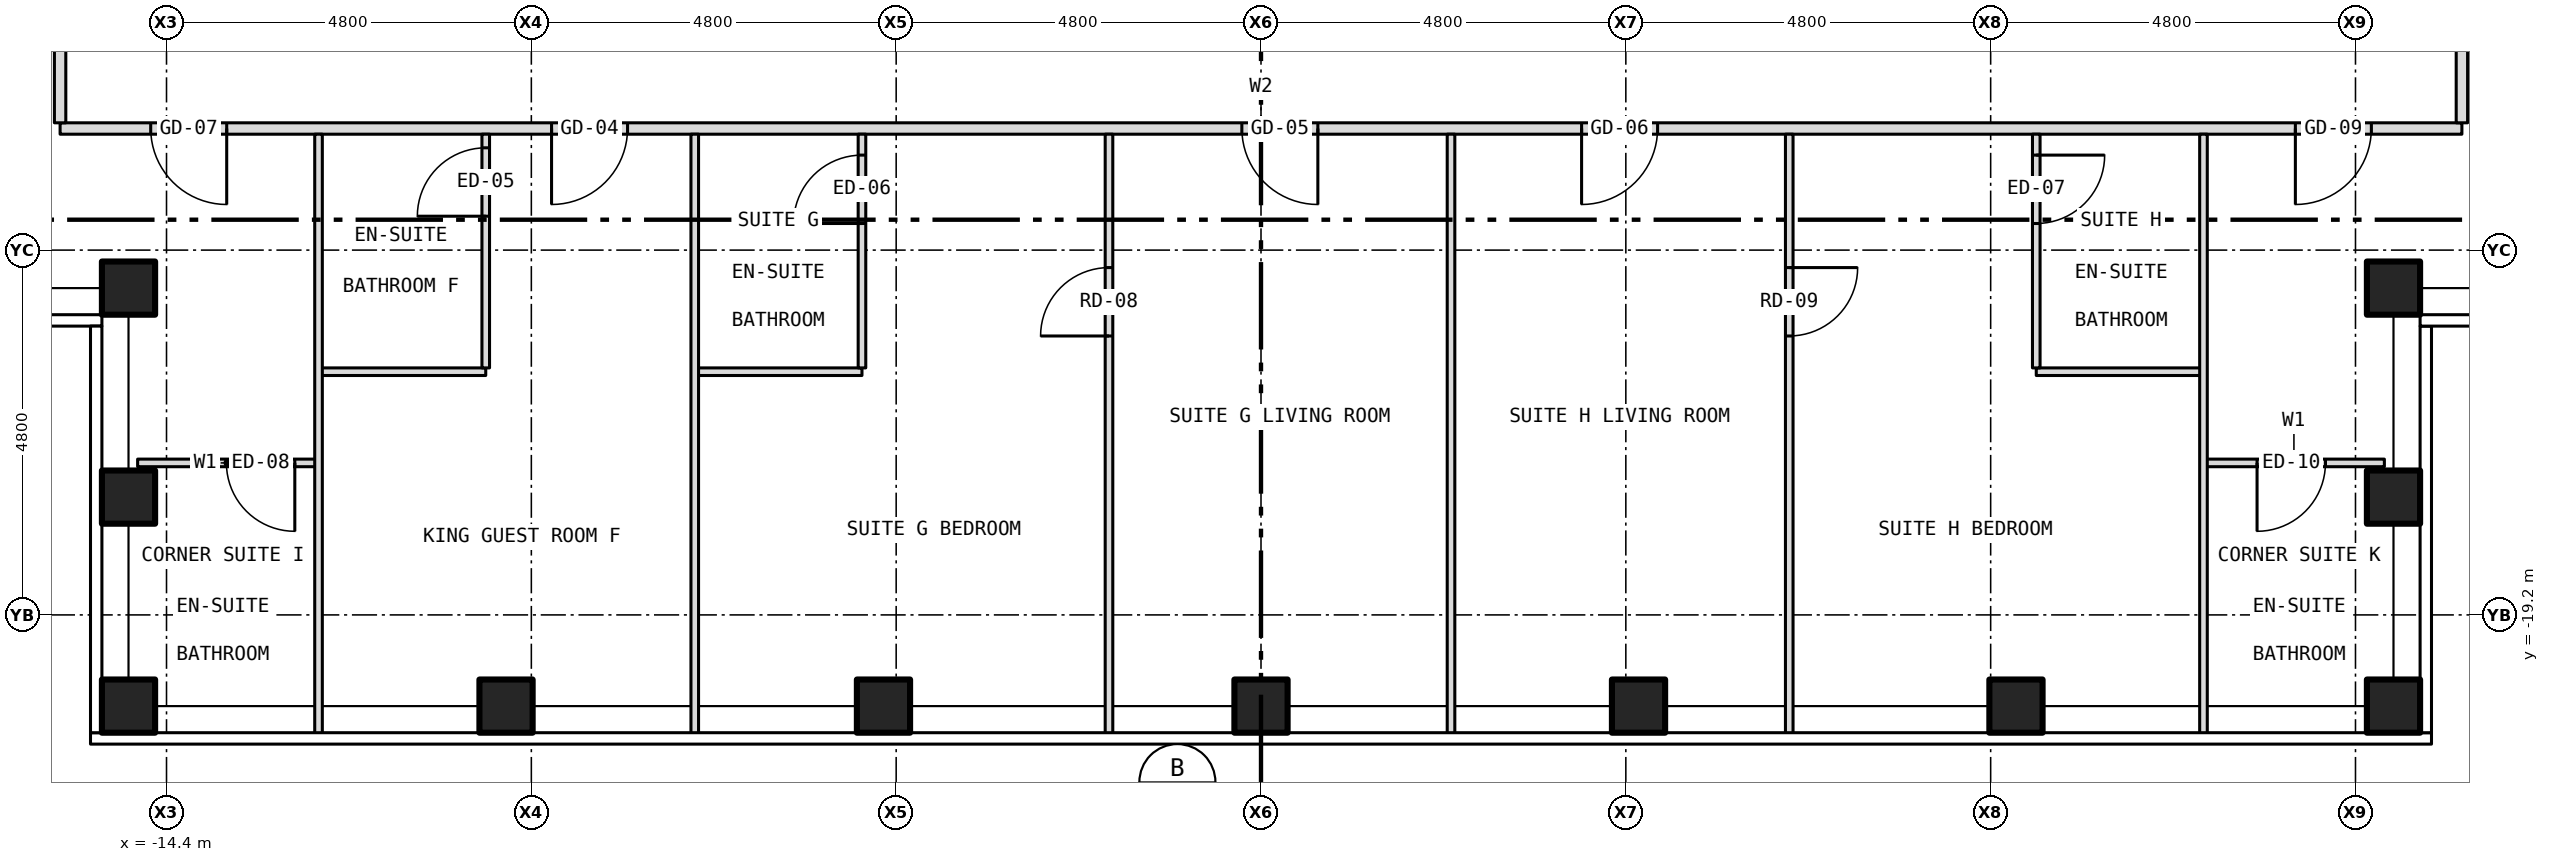
"""IFC4 building model, lengths in metres.
Left out: names, types, materials, properties, quantities, classifications, styles, units other than length and angle.
Written with IfcOpenShell. Run it as: python <this file> out.ifc"""

import sys

from ifc_helpers import new_model, si_unit, direction, frame, frame_2d, origin, origin_2d, place, context, subcontext, project, spatial, rectangle, hollow_rectangle, extrude, element, fill, save


model = new_model("IFC4")
c1 = context("Model", 3, precision=1e-05, world=origin(), true_north=direction((0.0, 1.0)))
c2 = subcontext(c1, "Body", "Model", "MODEL_VIEW")
j1 = project(units=[si_unit("LENGTHUNIT", "METRE"), si_unit("PLANEANGLEUNIT", "RADIAN")], contexts=[c1])
p1 = place(None, origin())
s1 = spatial("IfcSite", under=j1, at=p1, CompositionType="ELEMENT")
p2 = place(p1, origin())
s2 = spatial("IfcBuilding", under=s1, at=p2, CompositionType="ELEMENT")
p3 = place(p2, frame((0.0, 0.0, 215.5)))
s3 = spatial("IfcBuildingStorey", under=s2, at=p3, CompositionType="ELEMENT", Elevation=215.5)
for number, where, z_axis, x_axis in (
    (1, (-14.9, -20.4, -0.15), (0.0, 0.0, 1.0), (1.0, 0.0, 0.0)),
    (2, (-9.933, -20.4, -0.15), (0.0, 0.0, 1.0), (1.0, 0.0, 0.0)),
    (3, (-4.967, -20.4, -0.15), (0.0, 0.0, 1.0), (1.0, 0.0, 0.0)),
    (4, (0.0, -20.4, -0.15), (0.0, 0.0, 1.0), (1.0, 0.0, 0.0)),
    (5, (4.967, -20.4, -0.15), (0.0, 0.0, 1.0), (1.0, 0.0, 0.0)),
    (6, (9.933, -20.4, -0.15), (0.0, 0.0, 1.0), (1.0, 0.0, 0.0)),
    (7, (14.9, -20.4, -0.15), (0.0, 0.0, 1.0), (1.0, 0.0, 0.0)),
    (8, (-14.9, -14.9, -0.15), (0.0, 0.0, 1.0), (1.0, 0.0, 0.0)),
    (9, (-14.9, -17.65, -0.15), (0.0, 0.0, 1.0), (1.0, 0.0, 0.0)),
    (10, (14.9, -14.9, -0.15), (0.0, 0.0, 1.0), (1.0, 0.0, 0.0)),
    (11, (14.9, -17.65, -0.15), (0.0, 0.0, 1.0), (1.0, 0.0, 0.0)),
):
    element("IfcColumn", number, at=place(p3, frame(where, z_axis=z_axis, x_axis=x_axis)), inside=s3, PredefinedType="COLUMN", context=c2, shape_type="SweptSolid", body=[
        extrude(hollow_rectangle(XDim=0.7, YDim=0.7, WallThickness=0.04, at=origin_2d()), origin(), (0.0, 0.0, 1.0), 3.5),
    ])
p4 = place(p3, frame((-14.78, -17.2, 0.0), z_axis=(0.0, 0.0, 1.0), x_axis=(1.0, 0.0, 0.0)))
e12 = element("IfcWall", 12, at=p4, inside=s3, PredefinedType="PARTITIONING", context=c2, shape_type="SweptSolid", body=[
    extrude(rectangle(XDim=2.38, YDim=0.1, at=frame_2d((1.19, 0.0))), origin(), (0.0, 0.0, 1.0), 3.35),
])
p5 = place(p4, frame((1.168, 0.0, 0.0)))
e13 = element("IfcOpeningElement", 13, at=p5, cuts=e12, PredefinedType="OPENING", context=c2, shape_type="SweptSolid", body=[
    extrude(rectangle(XDim=0.9, YDim=2.1, at=frame_2d((0.45, 1.05))), frame((0.0, 0.062, 0.0), z_axis=(0.0, -1.0, 0.0), x_axis=(1.0, 0.0, 0.0)), (0.0, 0.0, 1.0), 0.124),
])
p6 = place(p3, frame((12.4, -17.2, 0.0), z_axis=(0.0, 0.0, 1.0), x_axis=(1.0, 0.0, 0.0)))
e14 = element("IfcWall", 14, at=p6, inside=s3, PredefinedType="PARTITIONING", context=c2, shape_type="SweptSolid", body=[
    extrude(rectangle(XDim=2.38, YDim=0.1, at=frame_2d((1.19, 0.0))), origin(), (0.0, 0.0, 1.0), 3.35),
])
p7 = place(p6, frame((0.705, 0.0, 0.0)))
e15 = element("IfcOpeningElement", 15, at=p7, cuts=e14, PredefinedType="OPENING", context=c2, shape_type="SweptSolid", body=[
    extrude(rectangle(XDim=0.9, YDim=2.1, at=frame_2d((0.45, 1.05))), frame((0.0, 0.062, 0.0), z_axis=(0.0, -1.0, 0.0), x_axis=(1.0, 0.0, 0.0)), (0.0, 0.0, 1.0), 0.124),
])
for number, where, z_axis, x_axis in (
    (16, (-12.4, -16.0, 0.0), (0.0, 0.0, 1.0), (1.0, 0.0, 0.0)),
    (17, (-7.45, -16.0, 0.0), (0.0, 0.0, 1.0), (1.0, 0.0, 0.0)),
    (18, (10.2, -16.0, 0.0), (0.0, 0.0, 1.0), (1.0, 0.0, 0.0)),
):
    element("IfcWall", number, at=place(p3, frame(where, z_axis=z_axis, x_axis=x_axis)), inside=s3, PredefinedType="PARTITIONING", context=c2, shape_type="SweptSolid", body=[
        extrude(rectangle(XDim=2.2, YDim=0.1, at=frame_2d((1.1, 0.0))), origin(), (0.0, 0.0, 1.0), 3.35),
    ])
p8 = place(p3, frame((-15.8, -12.8, 0.0), z_axis=(0.0, 0.0, 1.0), x_axis=(1.0, 0.0, 0.0)))
e19 = element("IfcWall", 19, at=p8, inside=s3, PredefinedType="PARTITIONING", context=c2, shape_type="SweptSolid", body=[
    extrude(rectangle(XDim=31.6, YDim=0.15, at=frame_2d((15.8, 0.0))), origin(), (0.0, 0.0, 1.0), 3.35),
])
p9 = place(p8, frame((6.466, 0.0, 0.0)))
e20 = element("IfcOpeningElement", 20, at=p9, cuts=e19, PredefinedType="OPENING", context=c2, shape_type="SweptSolid", body=[
    extrude(rectangle(XDim=1.0, YDim=2.1, at=frame_2d((0.5, 1.05))), frame((0.0, 0.087, 0.0), z_axis=(0.0, -1.0, 0.0), x_axis=(1.0, 0.0, 0.0)), (0.0, 0.0, 1.0), 0.174),
])
p10 = place(p8, frame((15.548, 0.0, 0.0)))
e21 = element("IfcOpeningElement", 21, at=p10, cuts=e19, PredefinedType="OPENING", context=c2, shape_type="SweptSolid", body=[
    extrude(rectangle(XDim=1.0, YDim=2.1, at=frame_2d((0.5, 1.05))), frame((0.0, 0.087, 0.0), z_axis=(0.0, -1.0, 0.0), x_axis=(1.0, 0.0, 0.0)), (0.0, 0.0, 1.0), 0.174),
])
p11 = place(p8, frame((20.018, 0.0, 0.0)))
e22 = element("IfcOpeningElement", 22, at=p11, cuts=e19, PredefinedType="OPENING", context=c2, shape_type="SweptSolid", body=[
    extrude(rectangle(XDim=1.0, YDim=2.1, at=frame_2d((0.5, 1.05))), frame((0.0, 0.087, 0.0), z_axis=(0.0, -1.0, 0.0), x_axis=(1.0, 0.0, 0.0)), (0.0, 0.0, 1.0), 0.174),
])
p12 = place(p8, frame((1.192, 0.0, 0.0)))
e23 = element("IfcOpeningElement", 23, at=p12, cuts=e19, PredefinedType="OPENING", context=c2, shape_type="SweptSolid", body=[
    extrude(rectangle(XDim=1.0, YDim=2.1, at=frame_2d((0.5, 1.05))), frame((0.0, 0.087, 0.0), z_axis=(0.0, -1.0, 0.0), x_axis=(1.0, 0.0, 0.0)), (0.0, 0.0, 1.0), 0.174),
])
p13 = place(p8, frame((29.409, 0.0, 0.0)))
e24 = element("IfcOpeningElement", 24, at=p13, cuts=e19, PredefinedType="OPENING", context=c2, shape_type="SweptSolid", body=[
    extrude(rectangle(XDim=1.0, YDim=2.1, at=frame_2d((0.5, 1.05))), frame((0.0, 0.087, 0.0), z_axis=(0.0, -1.0, 0.0), x_axis=(1.0, 0.0, 0.0)), (0.0, 0.0, 1.0), 0.174),
])
p14 = place(p3, frame((-15.8, -12.725, 0.0), z_axis=(0.0, 0.0, 1.0), x_axis=(0.0, 1.0, 0.0)))
e25 = element("IfcWall", 25, at=p14, inside=s3, PredefinedType="PARTITIONING", context=c2, shape_type="SweptSolid", body=[
    extrude(rectangle(XDim=1.805, YDim=0.15, at=frame_2d((0.903, 0.0))), origin(), (0.0, 0.0, 1.0), 3.35),
])
p15 = place(p3, frame((-12.4, -20.78, 0.0), z_axis=(0.0, 0.0, 1.0), x_axis=(0.0, 1.0, 0.0)))
e26 = element("IfcWall", 26, at=p15, inside=s3, PredefinedType="PARTITIONING", context=c2, shape_type="SweptSolid", body=[
    extrude(rectangle(XDim=7.905, YDim=0.1, at=frame_2d((3.953, 0.0))), origin(), (0.0, 0.0, 1.0), 3.35),
])
p16 = place(p3, frame((-10.2, -15.95, 0.0), z_axis=(0.0, 0.0, 1.0), x_axis=(0.0, 1.0, 0.0)))
e27 = element("IfcWall", 27, at=p16, inside=s3, PredefinedType="PARTITIONING", context=c2, shape_type="SweptSolid", body=[
    extrude(rectangle(XDim=3.075, YDim=0.1, at=frame_2d((1.538, 0.0))), origin(), (0.0, 0.0, 1.0), 3.35),
])
p17 = place(p16, frame((1.996, 0.0, 0.0)))
e28 = element("IfcOpeningElement", 28, at=p17, cuts=e27, PredefinedType="OPENING", context=c2, shape_type="SweptSolid", body=[
    extrude(rectangle(XDim=0.9, YDim=2.1, at=frame_2d((0.45, 1.05))), frame((0.0, 0.062, 0.0), z_axis=(0.0, -1.0, 0.0), x_axis=(1.0, 0.0, 0.0)), (0.0, 0.0, 1.0), 0.124),
])
p18 = place(p3, frame((-7.45, -20.78, 0.0), z_axis=(0.0, 0.0, 1.0), x_axis=(0.0, 1.0, 0.0)))
e29 = element("IfcWall", 29, at=p18, inside=s3, PredefinedType="PARTITIONING", context=c2, shape_type="SweptSolid", body=[
    extrude(rectangle(XDim=7.905, YDim=0.1, at=frame_2d((3.953, 0.0))), origin(), (0.0, 0.0, 1.0), 3.35),
])
p19 = place(p3, frame((-5.25, -15.95, 0.0), z_axis=(0.0, 0.0, 1.0), x_axis=(0.0, 1.0, 0.0)))
e30 = element("IfcWall", 30, at=p19, inside=s3, PredefinedType="PARTITIONING", context=c2, shape_type="SweptSolid", body=[
    extrude(rectangle(XDim=3.075, YDim=0.1, at=frame_2d((1.538, 0.0))), origin(), (0.0, 0.0, 1.0), 3.35),
])
p20 = place(p19, frame((1.9, 0.0, 0.0)))
e31 = element("IfcOpeningElement", 31, at=p20, cuts=e30, PredefinedType="OPENING", context=c2, shape_type="SweptSolid", body=[
    extrude(rectangle(XDim=0.9, YDim=2.1, at=frame_2d((0.45, 1.05))), frame((0.0, 0.062, 0.0), z_axis=(0.0, -1.0, 0.0), x_axis=(1.0, 0.0, 0.0)), (0.0, 0.0, 1.0), 0.124),
])
p21 = place(p3, frame((-2.0, -20.78, 0.0), z_axis=(0.0, 0.0, 1.0), x_axis=(0.0, 1.0, 0.0)))
e32 = element("IfcWall", 32, at=p21, inside=s3, PredefinedType="PARTITIONING", context=c2, shape_type="SweptSolid", body=[
    extrude(rectangle(XDim=7.905, YDim=0.1, at=frame_2d((3.953, 0.0))), origin(), (0.0, 0.0, 1.0), 3.35),
])
p22 = place(p21, frame((5.25, 0.0, 0.0)))
e33 = element("IfcOpeningElement", 33, at=p22, cuts=e32, PredefinedType="OPENING", context=c2, shape_type="SweptSolid", body=[
    extrude(rectangle(XDim=0.9, YDim=2.1, at=frame_2d((0.45, 1.05))), frame((0.0, 0.062, 0.0), z_axis=(0.0, -1.0, 0.0), x_axis=(1.0, 0.0, 0.0)), (0.0, 0.0, 1.0), 0.124),
])
p23 = place(p3, frame((2.5, -20.78, 0.0), z_axis=(0.0, 0.0, 1.0), x_axis=(0.0, 1.0, 0.0)))
e34 = element("IfcWall", 34, at=p23, inside=s3, PredefinedType="PARTITIONING", context=c2, shape_type="SweptSolid", body=[
    extrude(rectangle(XDim=7.905, YDim=0.1, at=frame_2d((3.953, 0.0))), origin(), (0.0, 0.0, 1.0), 3.35),
])
p24 = place(p3, frame((6.95, -20.78, 0.0), z_axis=(0.0, 0.0, 1.0), x_axis=(0.0, 1.0, 0.0)))
e35 = element("IfcWall", 35, at=p24, inside=s3, PredefinedType="PARTITIONING", context=c2, shape_type="SweptSolid", body=[
    extrude(rectangle(XDim=7.905, YDim=0.1, at=frame_2d((3.953, 0.0))), origin(), (0.0, 0.0, 1.0), 3.35),
])
p25 = place(p24, frame((5.25, 0.0, 0.0)))
e36 = element("IfcOpeningElement", 36, at=p25, cuts=e35, PredefinedType="OPENING", context=c2, shape_type="SweptSolid", body=[
    extrude(rectangle(XDim=0.9, YDim=2.1, at=frame_2d((0.45, 1.05))), frame((0.0, 0.062, 0.0), z_axis=(0.0, -1.0, 0.0), x_axis=(1.0, 0.0, 0.0)), (0.0, 0.0, 1.0), 0.124),
])
p26 = place(p3, frame((10.2, -15.95, 0.0), z_axis=(0.0, 0.0, 1.0), x_axis=(0.0, 1.0, 0.0)))
e37 = element("IfcWall", 37, at=p26, inside=s3, PredefinedType="PARTITIONING", context=c2, shape_type="SweptSolid", body=[
    extrude(rectangle(XDim=3.075, YDim=0.1, at=frame_2d((1.538, 0.0))), origin(), (0.0, 0.0, 1.0), 3.35),
])
p27 = place(p26, frame((1.9, 0.0, 0.0)))
e38 = element("IfcOpeningElement", 38, at=p27, cuts=e37, PredefinedType="OPENING", context=c2, shape_type="SweptSolid", body=[
    extrude(rectangle(XDim=0.9, YDim=2.1, at=frame_2d((0.45, 1.05))), frame((0.0, 0.062, 0.0), z_axis=(0.0, -1.0, 0.0), x_axis=(1.0, 0.0, 0.0)), (0.0, 0.0, 1.0), 0.124),
])
p28 = place(p3, frame((12.4, -20.78, 0.0), z_axis=(0.0, 0.0, 1.0), x_axis=(0.0, 1.0, 0.0)))
e39 = element("IfcWall", 39, at=p28, inside=s3, PredefinedType="PARTITIONING", context=c2, shape_type="SweptSolid", body=[
    extrude(rectangle(XDim=7.905, YDim=0.1, at=frame_2d((3.953, 0.0))), origin(), (0.0, 0.0, 1.0), 3.35),
])
p29 = place(p3, frame((15.8, -12.725, 0.0), z_axis=(0.0, 0.0, 1.0), x_axis=(0.0, 1.0, 0.0)))
e40 = element("IfcWall", 40, at=p29, inside=s3, PredefinedType="PARTITIONING", context=c2, shape_type="SweptSolid", body=[
    extrude(rectangle(XDim=1.805, YDim=0.15, at=frame_2d((0.903, 0.0))), origin(), (0.0, 0.0, 1.0), 3.35),
])
p30 = place(p9, origin())
e41 = element("IfcDoor", 41, at=p30, inside=s3, OperationType="SINGLE_SWING_LEFT", PredefinedType="DOOR", context=c2, shape_type="SweptSolid", body=[
    extrude(rectangle(XDim=1.0, YDim=2.1, at=frame_2d((0.5, 1.05))), frame((0.0, 0.025, 0.0), z_axis=(0.0, -1.0, 0.0), x_axis=(1.0, 0.0, 0.0)), (0.0, 0.0, 1.0), 0.05),
])
fill(e20, e41)
p31 = place(p17, origin())
e42 = element("IfcDoor", 42, at=p31, inside=s3, OperationType="SINGLE_SWING_LEFT", PredefinedType="DOOR", context=c2, shape_type="SweptSolid", body=[
    extrude(rectangle(XDim=0.9, YDim=2.1, at=frame_2d((0.45, 1.05))), frame((0.0, 0.025, 0.0), z_axis=(0.0, -1.0, 0.0), x_axis=(1.0, 0.0, 0.0)), (0.0, 0.0, 1.0), 0.05),
])
fill(e28, e42)
p32 = place(p10, origin())
e43 = element("IfcDoor", 43, at=p32, inside=s3, OperationType="SINGLE_SWING_RIGHT", PredefinedType="DOOR", context=c2, shape_type="SweptSolid", body=[
    extrude(rectangle(XDim=1.0, YDim=2.1, at=frame_2d((0.5, 1.05))), frame((0.0, 0.025, 0.0), z_axis=(0.0, -1.0, 0.0), x_axis=(1.0, 0.0, 0.0)), (0.0, 0.0, 1.0), 0.05),
])
fill(e21, e43)
p33 = place(p22, origin())
e44 = element("IfcDoor", 44, at=p33, inside=s3, OperationType="SINGLE_SWING_LEFT", PredefinedType="DOOR", context=c2, shape_type="SweptSolid", body=[
    extrude(rectangle(XDim=0.9, YDim=2.1, at=frame_2d((0.45, 1.05))), frame((0.0, 0.025, 0.0), z_axis=(0.0, -1.0, 0.0), x_axis=(1.0, 0.0, 0.0)), (0.0, 0.0, 1.0), 0.05),
])
fill(e33, e44)
p34 = place(p20, origin())
e45 = element("IfcDoor", 45, at=p34, inside=s3, OperationType="SINGLE_SWING_LEFT", PredefinedType="DOOR", context=c2, shape_type="SweptSolid", body=[
    extrude(rectangle(XDim=0.9, YDim=2.1, at=frame_2d((0.45, 1.05))), frame((0.0, 0.025, 0.0), z_axis=(0.0, -1.0, 0.0), x_axis=(1.0, 0.0, 0.0)), (0.0, 0.0, 1.0), 0.05),
])
fill(e31, e45)
p35 = place(p11, origin())
e46 = element("IfcDoor", 46, at=p35, inside=s3, OperationType="SINGLE_SWING_LEFT", PredefinedType="DOOR", context=c2, shape_type="SweptSolid", body=[
    extrude(rectangle(XDim=1.0, YDim=2.1, at=frame_2d((0.5, 1.05))), frame((0.0, 0.025, 0.0), z_axis=(0.0, -1.0, 0.0), x_axis=(1.0, 0.0, 0.0)), (0.0, 0.0, 1.0), 0.05),
])
fill(e22, e46)
p36 = place(p25, origin())
e47 = element("IfcDoor", 47, at=p36, inside=s3, OperationType="SINGLE_SWING_RIGHT", PredefinedType="DOOR", context=c2, shape_type="SweptSolid", body=[
    extrude(rectangle(XDim=0.9, YDim=2.1, at=frame_2d((0.45, 1.05))), frame((0.0, 0.025, 0.0), z_axis=(0.0, -1.0, 0.0), x_axis=(1.0, 0.0, 0.0)), (0.0, 0.0, 1.0), 0.05),
])
fill(e36, e47)
p37 = place(p27, origin())
e48 = element("IfcDoor", 48, at=p37, inside=s3, OperationType="SINGLE_SWING_RIGHT", PredefinedType="DOOR", context=c2, shape_type="SweptSolid", body=[
    extrude(rectangle(XDim=0.9, YDim=2.1, at=frame_2d((0.45, 1.05))), frame((0.0, 0.025, 0.0), z_axis=(0.0, -1.0, 0.0), x_axis=(1.0, 0.0, 0.0)), (0.0, 0.0, 1.0), 0.05),
])
fill(e38, e48)
p38 = place(p5, origin())
e49 = element("IfcDoor", 49, at=p38, inside=s3, OperationType="SINGLE_SWING_RIGHT", PredefinedType="DOOR", context=c2, shape_type="SweptSolid", body=[
    extrude(rectangle(XDim=0.9, YDim=2.1, at=frame_2d((0.45, 1.05))), frame((0.0, 0.025, 0.0), z_axis=(0.0, -1.0, 0.0), x_axis=(1.0, 0.0, 0.0)), (0.0, 0.0, 1.0), 0.05),
])
fill(e13, e49)
p39 = place(p12, origin())
e50 = element("IfcDoor", 50, at=p39, inside=s3, OperationType="SINGLE_SWING_RIGHT", PredefinedType="DOOR", context=c2, shape_type="SweptSolid", body=[
    extrude(rectangle(XDim=1.0, YDim=2.1, at=frame_2d((0.5, 1.05))), frame((0.0, 0.025, 0.0), z_axis=(0.0, -1.0, 0.0), x_axis=(1.0, 0.0, 0.0)), (0.0, 0.0, 1.0), 0.05),
])
fill(e23, e50)
p40 = place(p7, origin())
e51 = element("IfcDoor", 51, at=p40, inside=s3, OperationType="SINGLE_SWING_LEFT", PredefinedType="DOOR", context=c2, shape_type="SweptSolid", body=[
    extrude(rectangle(XDim=0.9, YDim=2.1, at=frame_2d((0.45, 1.05))), frame((0.0, 0.025, 0.0), z_axis=(0.0, -1.0, 0.0), x_axis=(1.0, 0.0, 0.0)), (0.0, 0.0, 1.0), 0.05),
])
fill(e15, e51)
p41 = place(p13, origin())
e52 = element("IfcDoor", 52, at=p41, inside=s3, OperationType="SINGLE_SWING_LEFT", PredefinedType="DOOR", context=c2, shape_type="SweptSolid", body=[
    extrude(rectangle(XDim=1.0, YDim=2.1, at=frame_2d((0.5, 1.05))), frame((0.0, 0.025, 0.0), z_axis=(0.0, -1.0, 0.0), x_axis=(1.0, 0.0, 0.0)), (0.0, 0.0, 1.0), 0.05),
])
fill(e24, e52)
save(model, sys.argv[1])
